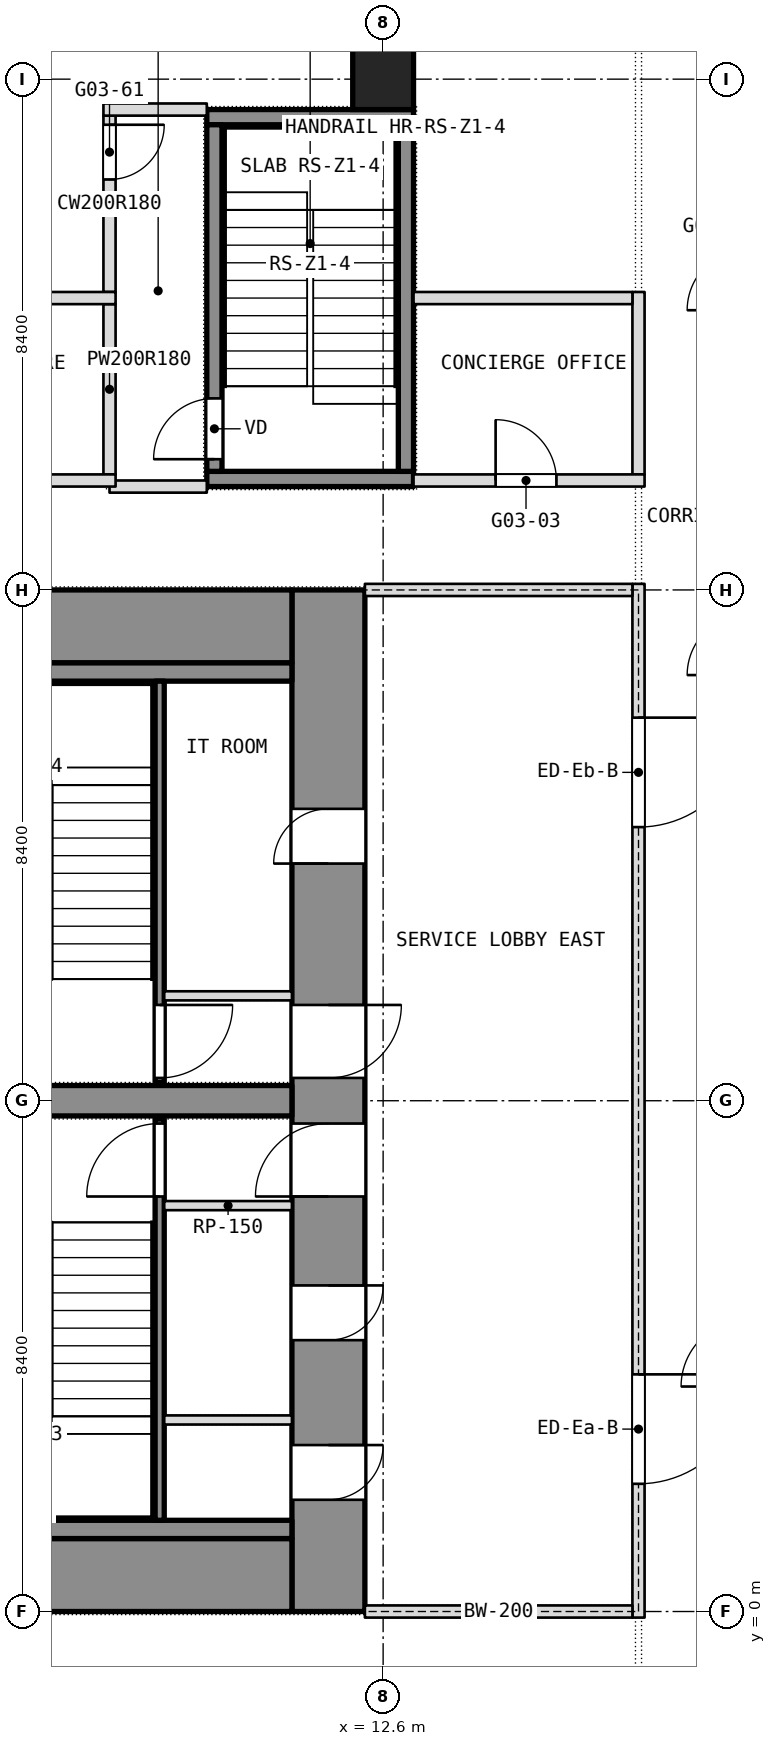
"""IFC4 building model, lengths in metres.
Left out: names, types, materials, properties, quantities, classifications, styles, units other than length and angle.
Written with IfcOpenShell. Run it as: python <this file> out.ifc"""

import sys

from ifc_helpers import new_model, si_unit, direction, frame, frame_2d, origin, origin_2d, place, context, subcontext, project, spatial, rectangle, extrude, element, fill, save


model = new_model("IFC4")
c1 = context("Model", 3, precision=1e-05, world=origin(), true_north=direction((0.0, 1.0)))
c2 = subcontext(c1, "Body", "Model", "MODEL_VIEW")
j1 = project(units=[si_unit("LENGTHUNIT", "METRE"), si_unit("PLANEANGLEUNIT", "RADIAN")], contexts=[c1])
p1 = place(None, origin())
s1 = spatial("IfcSite", under=j1, at=p1, CompositionType="ELEMENT")
p2 = place(p1, origin())
s2 = spatial("IfcBuilding", under=s1, at=p2, CompositionType="ELEMENT")
p3 = place(p2, frame((0.0, 0.0, 47.3)))
s3 = spatial("IfcBuildingStorey", under=s2, at=p3, CompositionType="ELEMENT", Elevation=47.3)
p4 = place(p3, frame((11.7, 0.0, 0.0), z_axis=(0.0, 0.0, 1.0), x_axis=(0.0, 1.0, 0.0)))
e1 = element("IfcWall", 1, at=p4, inside=s3, PredefinedType="SHEAR", context=c2, shape_type="SweptSolid", body=[
    extrude(rectangle(XDim=16.8, YDim=1.2, at=frame_2d((8.4, 0.0))), origin(), (0.0, 0.0, 1.0), 3.6),
])
p5 = place(p4, frame((1.837, 0.0, 0.0)))
e2 = element("IfcOpeningElement", 2, at=p5, cuts=e1, PredefinedType="OPENING", context=c2, shape_type="SweptSolid", body=[
    extrude(rectangle(XDim=0.9, YDim=2.1, at=frame_2d((0.45, 1.05))), frame((0.0, 0.6, 0.0), z_axis=(0.0, -1.0, 0.0), x_axis=(1.0, 0.0, 0.0)), (0.0, 0.0, 1.0), 1.2),
])
p6 = place(p4, frame((4.462, 0.0, 0.0)))
e3 = element("IfcOpeningElement", 3, at=p6, cuts=e1, PredefinedType="OPENING", context=c2, shape_type="SweptSolid", body=[
    extrude(rectangle(XDim=0.9, YDim=2.1, at=frame_2d((0.45, 1.05))), frame((0.0, 0.6, 0.0), z_axis=(0.0, -1.0, 0.0), x_axis=(1.0, 0.0, 0.0)), (0.0, 0.0, 1.0), 1.2),
])
p7 = place(p4, frame((6.825, 0.0, 0.0)))
e4 = element("IfcOpeningElement", 4, at=p7, cuts=e1, PredefinedType="OPENING", context=c2, shape_type="SweptSolid", body=[
    extrude(rectangle(XDim=1.2, YDim=2.1, at=frame_2d((0.6, 1.05))), frame((0.0, 0.6, 0.0), z_axis=(0.0, -1.0, 0.0), x_axis=(1.0, 0.0, 0.0)), (0.0, 0.0, 1.0), 1.2),
])
p8 = place(p4, frame((12.3, 0.0, 0.0)))
e5 = element("IfcOpeningElement", 5, at=p8, cuts=e1, PredefinedType="OPENING", context=c2, shape_type="SweptSolid", body=[
    extrude(rectangle(XDim=0.9, YDim=2.1, at=frame_2d((0.45, 1.05))), frame((0.0, 0.6, 0.0), z_axis=(0.0, -1.0, 0.0), x_axis=(1.0, 0.0, 0.0)), (0.0, 0.0, 1.0), 1.2),
])
p9 = place(p4, frame((8.775, 0.0, 0.0)))
e6 = element("IfcOpeningElement", 6, at=p9, cuts=e1, PredefinedType="OPENING", context=c2, shape_type="SweptSolid", body=[
    extrude(rectangle(XDim=1.2, YDim=2.1, at=frame_2d((0.6, 1.05))), frame((0.0, 0.6, 0.0), z_axis=(0.0, -1.0, 0.0), x_axis=(1.0, 0.0, 0.0)), (0.0, 0.0, 1.0), 1.2),
])
for number, where, z_axis, x_axis in (
    (7, (-11.1, 0.6, 0.0), (0.0, 0.0, 1.0), (1.0, 0.0, 0.0)),
    (8, (-11.1, 16.2, 0.0), (0.0, 0.0, 1.0), (1.0, 0.0, 0.0)),
):
    element("IfcWall", number, at=place(p3, frame(where, z_axis=z_axis, x_axis=x_axis)), inside=s3, PredefinedType="SHEAR", context=c2, shape_type="SweptSolid", body=[
        extrude(rectangle(XDim=22.2, YDim=1.2, at=frame_2d((11.1, 0.0))), origin(), (0.0, 0.0, 1.0), 3.6),
    ])
p10 = place(p3, frame((4.45, 8.4, 0.0), z_axis=(0.0, 0.0, 1.0), x_axis=(1.0, 0.0, 0.0)))
e9 = element("IfcWall", 9, at=p10, inside=s3, PredefinedType="SHEAR", context=c2, shape_type="SweptSolid", body=[
    extrude(rectangle(XDim=6.65, YDim=0.5, at=frame_2d((3.325, 0.0))), origin(), (0.0, 0.0, 1.0), 3.6),
])
p11 = place(p3, frame((12.6, 25.2, 0.0), z_axis=(0.0, 0.0, 1.0), x_axis=(1.0, 0.0, 0.0)))
e10 = element("IfcColumn", 10, at=p11, inside=s3, PredefinedType="COLUMN", context=c2, shape_type="SweptSolid", body=[
    extrude(rectangle(XDim=1.0, YDim=1.0, at=origin_2d()), origin(), (0.0, 0.0, 1.0), 3.6),
])
p12 = place(p3, frame((16.8, 18.7, 0.0), z_axis=(0.0, 0.0, 1.0), x_axis=(0.0, 1.0, 0.0)))
e11 = element("IfcWall", 11, at=p12, inside=s3, PredefinedType="PARTITIONING", context=c2, shape_type="SweptSolid", body=[
    extrude(rectangle(XDim=3.0, YDim=0.2, at=frame_2d((1.5, 0.0))), origin(), (0.0, 0.0, 1.0), 3.34),
])
p13 = place(p3, frame((8.1, 18.7, 0.0), z_axis=(0.0, 0.0, 1.0), x_axis=(0.0, 1.0, 0.0)))
e12 = element("IfcWall", 12, at=p13, inside=s3, PredefinedType="PARTITIONING", context=c2, shape_type="SweptSolid", body=[
    extrude(rectangle(XDim=2.8, YDim=0.2, at=frame_2d((1.4, 0.0))), origin(), (0.0, 0.0, 1.0), 3.34),
])
p14 = place(p3, frame((8.1, 21.7, 0.0), z_axis=(0.0, 0.0, 1.0), x_axis=(0.0, 1.0, 0.0)))
e13 = element("IfcWall", 13, at=p14, inside=s3, PredefinedType="PARTITIONING", context=c2, shape_type="SweptSolid", body=[
    extrude(rectangle(XDim=2.9, YDim=0.2, at=frame_2d((1.45, 0.0))), origin(), (0.0, 0.0, 1.0), 3.34),
])
p15 = place(p14, frame((1.85, 0.0, 0.0)))
e14 = element("IfcOpeningElement", 14, at=p15, cuts=e13, PredefinedType="OPENING", context=c2, shape_type="SweptSolid", body=[
    extrude(rectangle(XDim=0.9, YDim=2.1, at=frame_2d((0.45, 1.05))), frame((0.0, 0.1, 0.0), z_axis=(0.0, -1.0, 0.0), x_axis=(1.0, 0.0, 0.0)), (0.0, 0.0, 1.0), 0.2),
])
p16 = place(p3, frame((8.1, 18.5, 0.0), z_axis=(0.0, 0.0, 1.0), x_axis=(1.0, 0.0, 0.0)))
e15 = element("IfcWall", 15, at=p16, inside=s3, PredefinedType="PARTITIONING", context=c2, shape_type="SweptSolid", body=[
    extrude(rectangle(XDim=1.6, YDim=0.2, at=frame_2d((0.8, 0.0))), origin(), (0.0, 0.0, 1.0), 3.34),
])
p17 = place(p3, frame((-16.9, 18.6, 0.0), z_axis=(0.0, 0.0, 1.0), x_axis=(1.0, 0.0, 0.0)))
e16 = element("IfcWall", 16, at=p17, inside=s3, PredefinedType="PARTITIONING", context=c2, shape_type="SweptSolid", body=[
    extrude(rectangle(XDim=25.1, YDim=0.2, at=frame_2d((12.55, 0.0))), origin(), (0.0, 0.0, 1.0), 3.34),
])
p18 = place(p17, frame((16.0, 0.0, 0.0)))
e17 = element("IfcOpeningElement", 17, at=p18, cuts=e16, PredefinedType="OPENING", context=c2, shape_type="SweptSolid", body=[
    extrude(rectangle(XDim=1.8, YDim=2.1, at=frame_2d((0.9, 1.05))), frame((0.0, 0.1, 0.0), z_axis=(0.0, -1.0, 0.0), x_axis=(1.0, 0.0, 0.0)), (0.0, 0.0, 1.0), 0.2),
])
p19 = place(p17, frame((22.55, 0.0, 0.0)))
e18 = element("IfcOpeningElement", 18, at=p19, cuts=e16, PredefinedType="OPENING", context=c2, shape_type="SweptSolid", body=[
    extrude(rectangle(XDim=1.0, YDim=2.1, at=frame_2d((0.5, 1.05))), frame((0.0, 0.1, 0.0), z_axis=(0.0, -1.0, 0.0), x_axis=(1.0, 0.0, 0.0)), (0.0, 0.0, 1.0), 0.2),
])
p20 = place(p17, frame((5.9, 0.0, 0.0)))
e19 = element("IfcOpeningElement", 19, at=p20, cuts=e16, PredefinedType="OPENING", context=c2, shape_type="SweptSolid", body=[
    extrude(rectangle(XDim=1.0, YDim=2.1, at=frame_2d((0.5, 1.05))), frame((0.0, 0.1, 0.0), z_axis=(0.0, -1.0, 0.0), x_axis=(1.0, 0.0, 0.0)), (0.0, 0.0, 1.0), 0.2),
])
p21 = place(p17, frame((10.1, 0.0, 0.0)))
e20 = element("IfcOpeningElement", 20, at=p21, cuts=e16, PredefinedType="OPENING", context=c2, shape_type="SweptSolid", body=[
    extrude(rectangle(XDim=1.0, YDim=2.1, at=frame_2d((0.5, 1.05))), frame((0.0, 0.1, 0.0), z_axis=(0.0, -1.0, 0.0), x_axis=(1.0, 0.0, 0.0)), (0.0, 0.0, 1.0), 0.2),
])
p22 = place(p17, frame((1.7, 0.0, 0.0)))
e21 = element("IfcOpeningElement", 21, at=p22, cuts=e16, PredefinedType="OPENING", context=c2, shape_type="SweptSolid", body=[
    extrude(rectangle(XDim=1.0, YDim=2.1, at=frame_2d((0.5, 1.05))), frame((0.0, 0.1, 0.0), z_axis=(0.0, -1.0, 0.0), x_axis=(1.0, 0.0, 0.0)), (0.0, 0.0, 1.0), 0.2),
])
p23 = place(p3, frame((13.1, 18.6, 0.0), z_axis=(0.0, 0.0, 1.0), x_axis=(1.0, 0.0, 0.0)))
e22 = element("IfcWall", 22, at=p23, inside=s3, PredefinedType="PARTITIONING", context=c2, shape_type="SweptSolid", body=[
    extrude(rectangle(XDim=3.8, YDim=0.2, at=frame_2d((1.9, 0.0))), origin(), (0.0, 0.0, 1.0), 3.34),
])
p24 = place(p23, frame((1.35, 0.0, 0.0)))
e23 = element("IfcOpeningElement", 23, at=p24, cuts=e22, PredefinedType="OPENING", context=c2, shape_type="SweptSolid", body=[
    extrude(rectangle(XDim=1.0, YDim=2.1, at=frame_2d((0.5, 1.05))), frame((0.0, 0.1, 0.0), z_axis=(0.0, -1.0, 0.0), x_axis=(1.0, 0.0, 0.0)), (0.0, 0.0, 1.0), 0.2),
])
p25 = place(p3, frame((-16.7, 21.6, 0.0), z_axis=(0.0, 0.0, 1.0), x_axis=(1.0, 0.0, 0.0)))
e24 = element("IfcWall", 24, at=p25, inside=s3, PredefinedType="PARTITIONING", context=c2, shape_type="SweptSolid", body=[
    extrude(rectangle(XDim=24.9, YDim=0.2, at=frame_2d((12.45, 0.0))), origin(), (0.0, 0.0, 1.0), 3.34),
])
p26 = place(p25, frame((1.6, 0.0, 0.0)))
e25 = element("IfcOpeningElement", 25, at=p26, cuts=e24, PredefinedType="OPENING", context=c2, shape_type="SweptSolid", body=[
    extrude(rectangle(XDim=1.0, YDim=2.1, at=frame_2d((0.5, 1.05))), frame((0.0, 0.1, 0.0), z_axis=(0.0, -1.0, 0.0), x_axis=(1.0, 0.0, 0.0)), (0.0, 0.0, 1.0), 0.2),
])
p27 = place(p3, frame((13.1, 21.6, 0.0), z_axis=(0.0, 0.0, 1.0), x_axis=(1.0, 0.0, 0.0)))
e26 = element("IfcWall", 26, at=p27, inside=s3, PredefinedType="PARTITIONING", context=c2, shape_type="SweptSolid", body=[
    extrude(rectangle(XDim=3.6, YDim=0.2, at=frame_2d((1.8, 0.0))), origin(), (0.0, 0.0, 1.0), 3.34),
])
p28 = place(p3, frame((8.0, 24.7, 0.0), z_axis=(0.0, 0.0, 1.0), x_axis=(1.0, 0.0, 0.0)))
e27 = element("IfcWall", 27, at=p28, inside=s3, PredefinedType="PARTITIONING", context=c2, shape_type="SweptSolid", body=[
    extrude(rectangle(XDim=1.7, YDim=0.2, at=frame_2d((0.85, 0.0))), origin(), (0.0, 0.0, 1.0), 3.34),
])
for number, where, z_axis, x_axis in (
    (28, (-11.1, 1.35, 0.0), (0.0, 0.0, 1.0), (1.0, 0.0, 0.0)),
    (29, (-11.1, 15.45, 0.0), (0.0, 0.0, 1.0), (1.0, 0.0, 0.0)),
):
    element("IfcWall", number, at=place(p3, frame(where, z_axis=z_axis, x_axis=x_axis)), inside=s3, PredefinedType="PARTITIONING", context=c2, shape_type="SweptSolid", body=[
        extrude(rectangle(XDim=22.2, YDim=0.3, at=frame_2d((11.1, 0.0))), origin(), (0.0, 0.0, 1.0), 3.34),
    ])
p29 = place(p3, frame((8.925, 1.5, 0.0), z_axis=(0.0, 0.0, 1.0), x_axis=(0.0, 1.0, 0.0)))
e30 = element("IfcWall", 30, at=p29, inside=s3, PredefinedType="SHEAR", context=c2, shape_type="SweptSolid", body=[
    extrude(rectangle(XDim=6.6, YDim=0.15, at=frame_2d((3.3, 0.0))), origin(), (0.0, 0.0, 1.0), 3.34),
])
p30 = place(p29, frame((5.325, 0.0, 0.0)))
e31 = element("IfcOpeningElement", 31, at=p30, cuts=e30, PredefinedType="OPENING", context=c2, shape_type="SweptSolid", body=[
    extrude(rectangle(XDim=1.2, YDim=2.1, at=frame_2d((0.6, 1.05))), frame((0.0, 0.075, 0.0), z_axis=(0.0, -1.0, 0.0), x_axis=(1.0, 0.0, 0.0)), (0.0, 0.0, 1.0), 0.15),
])
for number, where, z_axis, x_axis in (
    (32, (9.0, 6.675, 0.0), (0.0, 0.0, 1.0), (1.0, 0.0, 0.0)),
    (33, (9.0, 3.15, 0.0), (0.0, 0.0, 1.0), (1.0, 0.0, 0.0)),
):
    element("IfcWall", number, at=place(p3, frame(where, z_axis=z_axis, x_axis=x_axis)), inside=s3, PredefinedType="PARTITIONING", context=c2, shape_type="SweptSolid", body=[
        extrude(rectangle(XDim=2.1, YDim=0.15, at=frame_2d((1.05, 0.0))), origin(), (0.0, 0.0, 1.0), 3.34),
    ])
p31 = place(p3, frame((8.925, 8.7, 0.0), z_axis=(0.0, 0.0, 1.0), x_axis=(0.0, 1.0, 0.0)))
e34 = element("IfcWall", 34, at=p31, inside=s3, PredefinedType="SHEAR", context=c2, shape_type="SweptSolid", body=[
    extrude(rectangle(XDim=6.6, YDim=0.15, at=frame_2d((3.3, 0.0))), origin(), (0.0, 0.0, 1.0), 3.34),
])
p32 = place(p31, frame((0.075, 0.0, 0.0)))
e35 = element("IfcOpeningElement", 35, at=p32, cuts=e34, PredefinedType="OPENING", context=c2, shape_type="SweptSolid", body=[
    extrude(rectangle(XDim=1.2, YDim=2.1, at=frame_2d((0.6, 1.05))), frame((0.0, 0.075, 0.0), z_axis=(0.0, -1.0, 0.0), x_axis=(1.0, 0.0, 0.0)), (0.0, 0.0, 1.0), 0.15),
])
p33 = place(p3, frame((9.0, 10.125, 0.0), z_axis=(0.0, 0.0, 1.0), x_axis=(1.0, 0.0, 0.0)))
e36 = element("IfcWall", 36, at=p33, inside=s3, PredefinedType="PARTITIONING", context=c2, shape_type="SweptSolid", body=[
    extrude(rectangle(XDim=2.1, YDim=0.15, at=frame_2d((1.05, 0.0))), origin(), (0.0, 0.0, 1.0), 3.34),
])
p34 = place(p3, frame((16.8, -0.1, 0.0), z_axis=(0.0, 0.0, 1.0), x_axis=(0.0, 1.0, 0.0)))
e37 = element("IfcWall", 37, at=p34, inside=s3, PredefinedType="PARTITIONING", context=c2, shape_type="SweptSolid", body=[
    extrude(rectangle(XDim=17.0, YDim=0.2, at=frame_2d((8.5, 0.0))), origin(), (0.0, 0.0, 1.0), 3.34),
])
p35 = place(p34, frame((2.2, 0.0, 0.0)))
e38 = element("IfcOpeningElement", 38, at=p35, cuts=e37, PredefinedType="OPENING", context=c2, shape_type="SweptSolid", body=[
    extrude(rectangle(XDim=1.8, YDim=2.1, at=frame_2d((0.9, 1.05))), frame((0.0, 0.1, 0.0), z_axis=(0.0, -1.0, 0.0), x_axis=(1.0, 0.0, 0.0)), (0.0, 0.0, 1.0), 0.2),
])
p36 = place(p34, frame((13.0, 0.0, 0.0)))
e39 = element("IfcOpeningElement", 39, at=p36, cuts=e37, PredefinedType="OPENING", context=c2, shape_type="SweptSolid", body=[
    extrude(rectangle(XDim=1.8, YDim=2.1, at=frame_2d((0.9, 1.05))), frame((0.0, 0.1, 0.0), z_axis=(0.0, -1.0, 0.0), x_axis=(1.0, 0.0, 0.0)), (0.0, 0.0, 1.0), 0.2),
])
for number, where, z_axis, x_axis in (
    (40, (12.3, 0.0, 0.0), (0.0, 0.0, 1.0), (1.0, 0.0, 0.0)),
    (41, (12.3, 16.8, 0.0), (0.0, 0.0, 1.0), (1.0, 0.0, 0.0)),
):
    element("IfcWall", number, at=place(p3, frame(where, z_axis=z_axis, x_axis=x_axis)), inside=s3, PredefinedType="PARTITIONING", context=c2, shape_type="SweptSolid", body=[
        extrude(rectangle(XDim=4.4, YDim=0.2, at=frame_2d((2.2, 0.0))), origin(), (0.0, 0.0, 1.0), 2.84),
    ])
for number, where, z_axis, x_axis in (
    (42, (9.7, 18.625, 0.1), (0.0, 0.0, 1.0), (1.0, 0.0, 0.0)),
    (43, (9.7, 24.575, 0.1), (0.0, 0.0, 1.0), (1.0, 0.0, 0.0)),
):
    element("IfcWall", number, at=place(p3, frame(where, z_axis=z_axis, x_axis=x_axis)), inside=s3, PredefinedType="SHEAR", context=c2, shape_type="SweptSolid", body=[
        extrude(rectangle(XDim=3.4, YDim=0.25, at=frame_2d((1.7, 0.0))), origin(), (0.0, 0.0, 1.0), 3.6),
    ])
p37 = place(p3, frame((9.825, 18.75, 0.1), z_axis=(0.0, 0.0, 1.0), x_axis=(0.0, 1.0, 0.0)))
e44 = element("IfcWall", 44, at=p37, inside=s3, PredefinedType="SHEAR", context=c2, shape_type="SweptSolid", body=[
    extrude(rectangle(XDim=5.7, YDim=0.25, at=frame_2d((2.85, 0.0))), origin(), (0.0, 0.0, 1.0), 3.6),
])
p38 = place(p37, frame((0.2, 0.0, 0.0)))
e45 = element("IfcOpeningElement", 45, at=p38, cuts=e44, PredefinedType="OPENING", context=c2, shape_type="SweptSolid", body=[
    extrude(rectangle(XDim=1.0, YDim=2.1, at=frame_2d((0.5, 1.05))), frame((0.0, 0.125, 0.0), z_axis=(0.0, -1.0, 0.0), x_axis=(1.0, 0.0, 0.0)), (0.0, 0.0, 1.0), 0.25),
])
p39 = place(p3, frame((12.975, 18.75, 0.1), z_axis=(0.0, 0.0, 1.0), x_axis=(0.0, 1.0, 0.0)))
e46 = element("IfcWall", 46, at=p39, inside=s3, PredefinedType="SHEAR", context=c2, shape_type="SweptSolid", body=[
    extrude(rectangle(XDim=5.7, YDim=0.25, at=frame_2d((2.85, 0.0))), origin(), (0.0, 0.0, 1.0), 3.6),
])
p40 = place(p15, origin())
e47 = element("IfcDoor", 47, at=p40, inside=s3, OperationType="SINGLE_SWING_LEFT", PredefinedType="DOOR", context=c2, shape_type="SweptSolid", body=[
    extrude(rectangle(XDim=0.9, YDim=2.1, at=frame_2d((0.45, 1.05))), frame((0.0, 0.025, 0.0), z_axis=(0.0, -1.0, 0.0), x_axis=(1.0, 0.0, 0.0)), (0.0, 0.0, 1.0), 0.05),
])
fill(e14, e47)
p41 = place(p24, origin())
e48 = element("IfcDoor", 48, at=p41, inside=s3, OperationType="SINGLE_SWING_LEFT", PredefinedType="DOOR", context=c2, shape_type="SweptSolid", body=[
    extrude(rectangle(XDim=1.0, YDim=2.1, at=frame_2d((0.5, 1.05))), frame((0.0, 0.025, 0.0), z_axis=(0.0, -1.0, 0.0), x_axis=(1.0, 0.0, 0.0)), (0.0, 0.0, 1.0), 0.05),
])
fill(e23, e48)
p42 = place(p38, origin())
e49 = element("IfcDoor", 49, at=p42, inside=s3, OperationType="SINGLE_SWING_LEFT", PredefinedType="DOOR", context=c2, shape_type="SweptSolid", body=[
    extrude(rectangle(XDim=1.0, YDim=2.1, at=frame_2d((0.5, 1.05))), frame((0.0, 0.025, 0.0), z_axis=(0.0, -1.0, 0.0), x_axis=(1.0, 0.0, 0.0)), (0.0, 0.0, 1.0), 0.05),
])
fill(e45, e49)
p43 = place(p5, origin())
e50 = element("IfcDoor", 50, at=p43, inside=s3, OperationType="SINGLE_SWING_LEFT", PredefinedType="DOOR", context=c2, shape_type="SweptSolid", body=[
    extrude(rectangle(XDim=0.9, YDim=2.1, at=frame_2d((0.45, 1.05))), frame((0.0, 0.025, 0.0), z_axis=(0.0, -1.0, 0.0), x_axis=(1.0, 0.0, 0.0)), (0.0, 0.0, 1.0), 0.05),
])
fill(e2, e50)
p44 = place(p6, origin())
e51 = element("IfcDoor", 51, at=p44, inside=s3, OperationType="SINGLE_SWING_LEFT", PredefinedType="DOOR", context=c2, shape_type="SweptSolid", body=[
    extrude(rectangle(XDim=0.9, YDim=2.1, at=frame_2d((0.45, 1.05))), frame((0.0, 0.025, 0.0), z_axis=(0.0, -1.0, 0.0), x_axis=(1.0, 0.0, 0.0)), (0.0, 0.0, 1.0), 0.05),
])
fill(e3, e51)
p45 = place(p7, origin())
e52 = element("IfcDoor", 52, at=p45, inside=s3, OperationType="SINGLE_SWING_LEFT", PredefinedType="DOOR", context=c2, shape_type="SweptSolid", body=[
    extrude(rectangle(XDim=1.2, YDim=2.1, at=frame_2d((0.6, 1.05))), frame((0.0, 0.025, 0.0), z_axis=(0.0, -1.0, 0.0), x_axis=(1.0, 0.0, 0.0)), (0.0, 0.0, 1.0), 0.05),
])
fill(e4, e52)
p46 = place(p30, origin())
e53 = element("IfcDoor", 53, at=p46, inside=s3, OperationType="SINGLE_SWING_LEFT", PredefinedType="DOOR", context=c2, shape_type="SweptSolid", body=[
    extrude(rectangle(XDim=1.2, YDim=2.1, at=frame_2d((0.6, 1.05))), frame((0.0, 0.025, 0.0), z_axis=(0.0, -1.0, 0.0), x_axis=(1.0, 0.0, 0.0)), (0.0, 0.0, 1.0), 0.05),
])
fill(e31, e53)
p47 = place(p8, origin())
e54 = element("IfcDoor", 54, at=p47, inside=s3, OperationType="SINGLE_SWING_LEFT", PredefinedType="DOOR", context=c2, shape_type="SweptSolid", body=[
    extrude(rectangle(XDim=0.9, YDim=2.1, at=frame_2d((0.45, 1.05))), frame((0.0, 0.025, 0.0), z_axis=(0.0, -1.0, 0.0), x_axis=(1.0, 0.0, 0.0)), (0.0, 0.0, 1.0), 0.05),
])
fill(e5, e54)
p48 = place(p9, origin())
e55 = element("IfcDoor", 55, at=p48, inside=s3, OperationType="SINGLE_SWING_LEFT", PredefinedType="DOOR", context=c2, shape_type="SweptSolid", body=[
    extrude(rectangle(XDim=1.2, YDim=2.1, at=frame_2d((0.6, 1.05))), frame((0.0, 0.025, 0.0), z_axis=(0.0, -1.0, 0.0), x_axis=(1.0, 0.0, 0.0)), (0.0, 0.0, 1.0), 0.05),
])
fill(e6, e55)
p49 = place(p32, origin())
e56 = element("IfcDoor", 56, at=p49, inside=s3, OperationType="SINGLE_SWING_LEFT", PredefinedType="DOOR", context=c2, shape_type="SweptSolid", body=[
    extrude(rectangle(XDim=1.2, YDim=2.1, at=frame_2d((0.6, 1.05))), frame((0.0, 0.025, 0.0), z_axis=(0.0, -1.0, 0.0), x_axis=(1.0, 0.0, 0.0)), (0.0, 0.0, 1.0), 0.05),
])
fill(e35, e56)
p50 = place(p35, origin())
e57 = element("IfcDoor", 57, at=p50, inside=s3, OperationType="DOUBLE_DOOR_SINGLE_SWING", PredefinedType="DOOR", context=c2, shape_type="SweptSolid", body=[
    extrude(rectangle(XDim=1.8, YDim=2.1, at=frame_2d((0.9, 1.05))), frame((0.0, 0.025, 0.0), z_axis=(0.0, -1.0, 0.0), x_axis=(1.0, 0.0, 0.0)), (0.0, 0.0, 1.0), 0.05),
])
fill(e38, e57)
p51 = place(p36, origin())
e58 = element("IfcDoor", 58, at=p51, inside=s3, OperationType="DOUBLE_DOOR_SINGLE_SWING", PredefinedType="DOOR", context=c2, shape_type="SweptSolid", body=[
    extrude(rectangle(XDim=1.8, YDim=2.1, at=frame_2d((0.9, 1.05))), frame((0.0, 0.025, 0.0), z_axis=(0.0, -1.0, 0.0), x_axis=(1.0, 0.0, 0.0)), (0.0, 0.0, 1.0), 0.05),
])
fill(e39, e58)
save(model, sys.argv[1])
